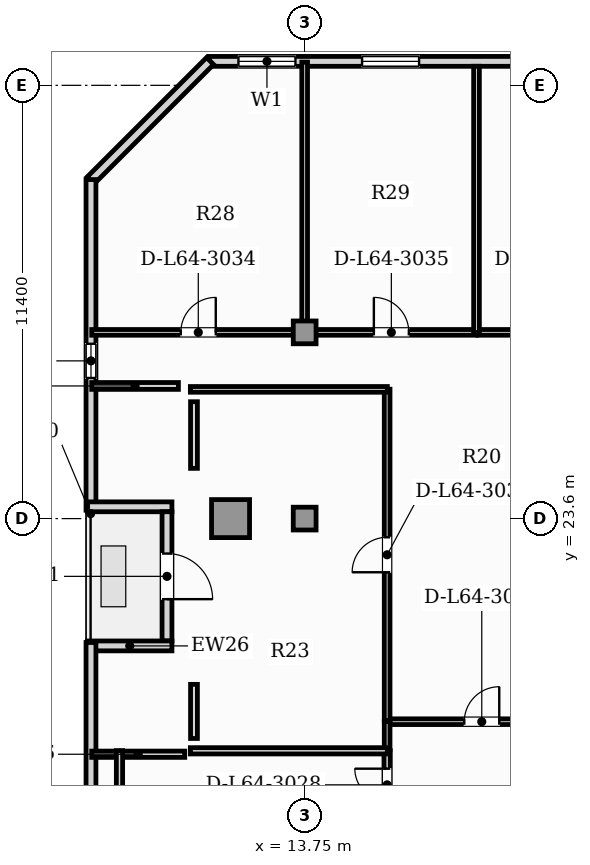
"""IFC4 building model, lengths in metres.
Left out: names, types, materials, properties, quantities, classifications, styles, units other than length and angle.
Written with IfcOpenShell. Run it as: python <this file> out.ifc"""

import sys

from ifc_helpers import new_model, si_unit, direction, frame, frame_2d, origin, origin_2d, place, context, subcontext, project, spatial, rectangle, hollow_rectangle, extrude, element, fill, save


model = new_model("IFC4")
c1 = context("Model", 3, precision=1e-05, world=origin(), true_north=direction((0.0, 1.0)))
c2 = subcontext(c1, "Body", "Model", "MODEL_VIEW")
j1 = project(units=[si_unit("LENGTHUNIT", "METRE"), si_unit("PLANEANGLEUNIT", "RADIAN")], contexts=[c1])
p1 = place(None, origin())
s1 = spatial("IfcSite", under=j1, at=p1, CompositionType="ELEMENT")
p2 = place(p1, origin())
s2 = spatial("IfcBuilding", under=s1, at=p2, CompositionType="ELEMENT")
p3 = place(p2, frame((0.0, 0.0, 260.6)))
s3 = spatial("IfcBuildingStorey", under=s2, at=p3, CompositionType="ELEMENT", Elevation=260.6)
p4 = place(p3, frame((11.8, 23.6, 0.0), z_axis=(0.0, 0.0, 1.0), x_axis=(1.0, 0.0, 0.0)))
e1 = element("IfcColumn", 1, at=p4, inside=s3, PredefinedType="USERDEFINED", context=c2, shape_type="SweptSolid", body=[
    extrude(hollow_rectangle(XDim=1.0, YDim=1.0, WallThickness=0.06, at=origin_2d()), origin(), (0.0, 0.0, 1.0), 3.85),
])
for number, where, z_axis, x_axis in (
    (2, (13.75, 23.6, 0.0), (0.0, 0.0, 1.0), (1.0, 0.0, 0.0)),
    (3, (13.75, 28.5, 0.0), (0.0, 0.0, 1.0), (1.0, 0.0, 0.0)),
):
    element("IfcColumn", number, at=place(p3, frame(where, z_axis=z_axis, x_axis=x_axis)), inside=s3, PredefinedType="COLUMN", context=c2, shape_type="SweptSolid", body=[
        extrude(rectangle(XDim=0.6, YDim=0.6, at=origin_2d()), origin(), (0.0, 0.0, 1.0), 3.85),
    ])
p5 = place(p3, frame((46.262, 35.631, 0.0), z_axis=(0.0, 0.0, 1.0), x_axis=(-1.0, 0.0, 0.0)))
e4 = element("IfcWall", 4, at=p5, inside=s3, PredefinedType="SOLIDWALL", context=c2, shape_type="SweptSolid", body=[
    extrude(rectangle(XDim=35.024, YDim=0.26, at=frame_2d((17.512, 0.0))), origin(), (0.0, 0.0, 1.0), 3.65),
])
p6 = place(p5, frame((32.755, 0.0, 0.9)))
e5 = element("IfcOpeningElement", 5, at=p6, cuts=e4, PredefinedType="OPENING", context=c2, shape_type="SweptSolid", body=[
    extrude(rectangle(XDim=1.5, YDim=1.95, at=frame_2d((0.75, 0.975))), frame((0.0, 0.14, 0.0), z_axis=(0.0, -1.0, 0.0), x_axis=(1.0, 0.0, 0.0)), (0.0, 0.0, 1.0), 0.28),
])
p7 = place(p5, frame((29.501, 0.0, 0.9)))
e6 = element("IfcOpeningElement", 6, at=p7, cuts=e4, PredefinedType="OPENING", context=c2, shape_type="SweptSolid", body=[
    extrude(rectangle(XDim=1.5, YDim=1.95, at=frame_2d((0.75, 0.975))), frame((0.0, 0.14, 0.0), z_axis=(0.0, -1.0, 0.0), x_axis=(1.0, 0.0, 0.0)), (0.0, 0.0, 1.0), 0.28),
])
p8 = place(p5, frame((24.255, 0.0, 0.9)))
e7 = element("IfcOpeningElement", 7, at=p8, cuts=e4, PredefinedType="OPENING", context=c2, shape_type="SweptSolid", body=[
    extrude(rectangle(XDim=1.5, YDim=1.95, at=frame_2d((0.75, 0.975))), frame((0.0, 0.14, 0.0), z_axis=(0.0, -1.0, 0.0), x_axis=(1.0, 0.0, 0.0)), (0.0, 0.0, 1.0), 0.28),
])
p9 = place(p5, frame((20.244, 0.0, 0.9)))
e8 = element("IfcOpeningElement", 8, at=p9, cuts=e4, PredefinedType="OPENING", context=c2, shape_type="SweptSolid", body=[
    extrude(rectangle(XDim=1.5, YDim=1.95, at=frame_2d((0.75, 0.975))), frame((0.0, 0.14, 0.0), z_axis=(0.0, -1.0, 0.0), x_axis=(1.0, 0.0, 0.0)), (0.0, 0.0, 1.0), 0.28),
])
p10 = place(p5, frame((14.427, 0.0, 0.9)))
e9 = element("IfcOpeningElement", 9, at=p10, cuts=e4, PredefinedType="OPENING", context=c2, shape_type="SweptSolid", body=[
    extrude(rectangle(XDim=1.5, YDim=1.95, at=frame_2d((0.75, 0.975))), frame((0.0, 0.14, 0.0), z_axis=(0.0, -1.0, 0.0), x_axis=(1.0, 0.0, 0.0)), (0.0, 0.0, 1.0), 0.28),
])
p11 = place(p5, frame((8.945, 0.0, 0.9)))
e10 = element("IfcOpeningElement", 10, at=p11, cuts=e4, PredefinedType="OPENING", context=c2, shape_type="SweptSolid", body=[
    extrude(rectangle(XDim=1.5, YDim=1.95, at=frame_2d((0.75, 0.975))), frame((0.0, 0.14, 0.0), z_axis=(0.0, -1.0, 0.0), x_axis=(1.0, 0.0, 0.0)), (0.0, 0.0, 1.0), 0.28),
])
p12 = place(p5, frame((4.139, 0.0, 0.9)))
e11 = element("IfcOpeningElement", 11, at=p12, cuts=e4, PredefinedType="OPENING", context=c2, shape_type="SweptSolid", body=[
    extrude(rectangle(XDim=1.5, YDim=1.95, at=frame_2d((0.75, 0.975))), frame((0.0, 0.14, 0.0), z_axis=(0.0, -1.0, 0.0), x_axis=(1.0, 0.0, 0.0)), (0.0, 0.0, 1.0), 0.28),
])
p13 = place(p3, frame((11.261, 35.64, 0.0), z_axis=(0.0, 0.0, 1.0), x_axis=(-0.707106781187, -0.707106781187, 0.0)))
e12 = element("IfcWall", 12, at=p13, inside=s3, PredefinedType="SOLIDWALL", context=c2, shape_type="SweptSolid", body=[
    extrude(rectangle(XDim=4.445, YDim=0.26, at=frame_2d((2.223, 0.0))), origin(), (0.0, 0.0, 1.0), 3.65),
])
p14 = place(p3, frame((8.128, 32.521, 0.0), z_axis=(0.0, 0.0, 1.0), x_axis=(0.0, -1.0, 0.0)))
e13 = element("IfcWall", 13, at=p14, inside=s3, PredefinedType="SOLIDWALL", context=c2, shape_type="SweptSolid", body=[
    extrude(rectangle(XDim=8.7, YDim=0.26, at=frame_2d((4.35, 0.0))), origin(), (0.0, 0.0, 1.0), 3.65),
])
p15 = place(p14, frame((4.321, 0.0, 0.95)))
e14 = element("IfcOpeningElement", 14, at=p15, cuts=e13, PredefinedType="OPENING", context=c2, shape_type="SweptSolid", body=[
    extrude(rectangle(XDim=0.9, YDim=1.5, at=frame_2d((0.45, 0.75))), frame((0.0, 0.14, 0.0), z_axis=(0.0, -1.0, 0.0), x_axis=(1.0, 0.0, 0.0)), (0.0, 0.0, 1.0), 0.28),
])
p16 = place(p3, frame((8.038, 23.91, 0.0), z_axis=(0.0, 0.0, 1.0), x_axis=(1.0, 0.0, 0.0)))
e15 = element("IfcWall", 15, at=p16, inside=s3, PredefinedType="SOLIDWALL", context=c2, shape_type="SweptSolid", body=[
    extrude(rectangle(XDim=2.22, YDim=0.26, at=frame_2d((1.11, 0.0))), origin(), (0.0, 0.0, 1.0), 3.65),
])
p17 = place(p3, frame((10.128, 23.78, 0.0), z_axis=(0.0, 0.0, 1.0), x_axis=(0.0, -1.0, 0.0)))
e16 = element("IfcWall", 16, at=p17, inside=s3, PredefinedType="SOLIDWALL", context=c2, shape_type="SweptSolid", body=[
    extrude(rectangle(XDim=3.4, YDim=0.26, at=frame_2d((1.7, 0.0))), origin(), (0.0, 0.0, 1.0), 3.19),
])
p18 = place(p17, frame((1.1, 0.0, 0.0)))
e17 = element("IfcOpeningElement", 17, at=p18, cuts=e16, PredefinedType="OPENING", context=c2, shape_type="SweptSolid", body=[
    extrude(rectangle(XDim=1.2, YDim=2.2, at=frame_2d((0.6, 1.1))), frame((0.0, 0.14, 0.0), z_axis=(0.0, -1.0, 0.0), x_axis=(1.0, 0.0, 0.0)), (0.0, 0.0, 1.0), 0.28),
])
p19 = place(p3, frame((10.258, 20.25, 0.0), z_axis=(0.0, 0.0, 1.0), x_axis=(-1.0, 0.0, 0.0)))
e18 = element("IfcWall", 18, at=p19, inside=s3, PredefinedType="SOLIDWALL", context=c2, shape_type="SweptSolid", body=[
    extrude(rectangle(XDim=2.22, YDim=0.26, at=frame_2d((1.11, 0.0))), origin(), (0.0, 0.0, 1.0), 3.65),
])
p20 = place(p3, frame((8.128, 20.34, 0.0), z_axis=(0.0, 0.0, 1.0), x_axis=(0.0, -1.0, 0.0)))
e19 = element("IfcWall", 19, at=p20, inside=s3, PredefinedType="SOLIDWALL", context=c2, shape_type="SweptSolid", body=[
    extrude(rectangle(XDim=17.1, YDim=0.26, at=frame_2d((8.55, 0.0))), origin(), (0.0, 0.0, 1.0), 3.65),
])
p21 = place(p20, frame((15.42, 0.0, 0.95)))
e20 = element("IfcOpeningElement", 20, at=p21, cuts=e19, PredefinedType="OPENING", context=c2, shape_type="SweptSolid", body=[
    extrude(rectangle(XDim=0.9, YDim=1.5, at=frame_2d((0.45, 0.75))), frame((0.0, 0.14, 0.0), z_axis=(0.0, -1.0, 0.0), x_axis=(1.0, 0.0, 0.0)), (0.0, 0.0, 1.0), 0.28),
])
p22 = place(p3, frame((15.915, 18.256, 0.0), z_axis=(0.0, 0.0, 1.0), x_axis=(1.0, 0.0, 0.0)))
e21 = element("IfcWall", 21, at=p22, inside=s3, PredefinedType="PARTITIONING", context=c2, shape_type="SweptSolid", body=[
    extrude(rectangle(XDim=4.99, YDim=0.15, at=frame_2d((2.495, 0.0))), origin(), (0.0, 0.0, 1.0), 3.65),
])
p23 = place(p22, frame((2.035, 0.0, 0.0)))
e22 = element("IfcOpeningElement", 22, at=p23, cuts=e21, PredefinedType="OPENING", context=c2, shape_type="SweptSolid", body=[
    extrude(rectangle(XDim=0.92, YDim=2.1, at=frame_2d((0.46, 1.05))), frame((0.0, 0.085, 0.0), z_axis=(0.0, -1.0, 0.0), x_axis=(1.0, 0.0, 0.0)), (0.0, 0.0, 1.0), 0.17),
])
p24 = place(p3, frame((15.92, 15.695, 0.0), z_axis=(0.0, 0.0, 1.0), x_axis=(0.0, 1.0, 0.0)))
e23 = element("IfcWall", 23, at=p24, inside=s3, PredefinedType="PLUMBINGWALL", context=c2, shape_type="SweptSolid", body=[
    extrude(rectangle(XDim=1.8, YDim=0.165, at=frame_2d((0.9, 0.0))), origin(), (0.0, 0.0, 1.0), 3.65),
])
p25 = place(p24, frame((0.475, 0.0, 0.0)))
e24 = element("IfcOpeningElement", 24, at=p25, cuts=e23, PredefinedType="OPENING", context=c2, shape_type="SweptSolid", body=[
    extrude(rectangle(XDim=0.85, YDim=2.1, at=frame_2d((0.425, 1.05))), frame((0.0, 0.093, 0.0), z_axis=(0.0, -1.0, 0.0), x_axis=(1.0, 0.0, 0.0)), (0.0, 0.0, 1.0), 0.185),
])
p26 = place(p3, frame((15.92, 17.525, 0.0), z_axis=(0.0, 0.0, 1.0), x_axis=(0.0, 1.0, 0.0)))
e25 = element("IfcWall", 25, at=p26, inside=s3, PredefinedType="PARTITIONING", context=c2, shape_type="SweptSolid", body=[
    extrude(rectangle(XDim=0.736, YDim=0.15, at=frame_2d((0.368, 0.0))), origin(), (0.0, 0.0, 1.0), 3.65),
])
p27 = place(p3, frame((15.92, 18.291, 0.0), z_axis=(0.0, 0.0, 1.0), x_axis=(0.0, 1.0, 0.0)))
e26 = element("IfcWall", 26, at=p27, inside=s3, PredefinedType="PARTITIONING", context=c2, shape_type="SweptSolid", body=[
    extrude(rectangle(XDim=8.714, YDim=0.15, at=frame_2d((4.357, 0.0))), origin(), (0.0, 0.0, 1.0), 3.65),
])
p28 = place(p27, frame((3.897, 0.0, 0.0)))
e27 = element("IfcOpeningElement", 27, at=p28, cuts=e26, PredefinedType="OPENING", context=c2, shape_type="SweptSolid", body=[
    extrude(rectangle(XDim=0.92, YDim=2.1, at=frame_2d((0.46, 1.05))), frame((0.0, 0.085, 0.0), z_axis=(0.0, -1.0, 0.0), x_axis=(1.0, 0.0, 0.0)), (0.0, 0.0, 1.0), 0.17),
])
p29 = place(p3, frame((10.743, 27.0, 0.0), z_axis=(0.0, 0.0, 1.0), x_axis=(1.0, 0.0, 0.0)))
e28 = element("IfcWall", 28, at=p29, inside=s3, PredefinedType="PARTITIONING", context=c2, shape_type="SweptSolid", body=[
    extrude(rectangle(XDim=5.182, YDim=0.15, at=frame_2d((2.591, 0.0))), origin(), (0.0, 0.0, 1.0), 3.65),
])
p30 = place(p3, frame((8.147, 28.5, 0.0), z_axis=(0.0, 0.0, 1.0), x_axis=(1.0, 0.0, 0.0)))
e29 = element("IfcWall", 29, at=p30, inside=s3, PredefinedType="PARTITIONING", context=c2, shape_type="SweptSolid", body=[
    extrude(rectangle(XDim=5.608, YDim=0.15, at=frame_2d((2.804, 0.0))), origin(), (0.0, 0.0, 1.0), 3.65),
])
p31 = place(p30, frame((2.344, 0.0, 0.0)))
e30 = element("IfcOpeningElement", 30, at=p31, cuts=e29, PredefinedType="OPENING", context=c2, shape_type="SweptSolid", body=[
    extrude(rectangle(XDim=0.92, YDim=2.1, at=frame_2d((0.46, 1.05))), frame((0.0, 0.085, 0.0), z_axis=(0.0, -1.0, 0.0), x_axis=(1.0, 0.0, 0.0)), (0.0, 0.0, 1.0), 0.17),
])
p32 = place(p3, frame((13.785, 28.5, 0.0), z_axis=(0.0, 0.0, 1.0), x_axis=(1.0, 0.0, 0.0)))
e31 = element("IfcWall", 31, at=p32, inside=s3, PredefinedType="PARTITIONING", context=c2, shape_type="SweptSolid", body=[
    extrude(rectangle(XDim=4.492, YDim=0.15, at=frame_2d((2.246, 0.0))), origin(), (0.0, 0.0, 1.0), 3.105),
])
p33 = place(p32, frame((1.786, 0.0, 0.0)))
e32 = element("IfcOpeningElement", 32, at=p33, cuts=e31, PredefinedType="OPENING", context=c2, shape_type="SweptSolid", body=[
    extrude(rectangle(XDim=0.92, YDim=2.1, at=frame_2d((0.46, 1.05))), frame((0.0, 0.085, 0.0), z_axis=(0.0, -1.0, 0.0), x_axis=(1.0, 0.0, 0.0)), (0.0, 0.0, 1.0), 0.17),
])
p34 = place(p3, frame((18.307, 28.5, 0.0), z_axis=(0.0, 0.0, 1.0), x_axis=(1.0, 0.0, 0.0)))
e33 = element("IfcWall", 33, at=p34, inside=s3, PredefinedType="PARTITIONING", context=c2, shape_type="SweptSolid", body=[
    extrude(rectangle(XDim=4.202, YDim=0.15, at=frame_2d((2.101, 0.0))), origin(), (0.0, 0.0, 1.0), 3.105),
])
p35 = place(p34, frame((1.011, 0.0, 0.0)))
e34 = element("IfcOpeningElement", 34, at=p35, cuts=e33, PredefinedType="OPENING", context=c2, shape_type="SweptSolid", body=[
    extrude(rectangle(XDim=0.92, YDim=2.1, at=frame_2d((0.46, 1.05))), frame((0.0, 0.085, 0.0), z_axis=(0.0, -1.0, 0.0), x_axis=(1.0, 0.0, 0.0)), (0.0, 0.0, 1.0), 0.17),
])
p36 = place(p3, frame((10.743, 17.49, 0.0), z_axis=(0.0, 0.0, 1.0), x_axis=(1.0, 0.0, 0.0)))
e35 = element("IfcWall", 35, at=p36, inside=s3, PredefinedType="PLUMBINGWALL", context=c2, shape_type="SweptSolid", body=[
    extrude(rectangle(XDim=5.182, YDim=0.165, at=frame_2d((2.591, 0.0))), origin(), (0.0, 0.0, 1.0), 3.65),
])
p37 = place(p3, frame((13.75, 28.495, 0.0), z_axis=(0.0, 0.0, 1.0), x_axis=(0.0, 1.0, 0.0)))
e36 = element("IfcWall", 36, at=p37, inside=s3, PredefinedType="PARTITIONING", context=c2, shape_type="SweptSolid", body=[
    extrude(rectangle(XDim=7.116, YDim=0.15, at=frame_2d((3.558, 0.0))), origin(), (0.0, 0.0, 1.0), 3.65),
])
p38 = place(p3, frame((18.272, 28.495, 0.0), z_axis=(0.0, 0.0, 1.0), x_axis=(0.0, 1.0, 0.0)))
e37 = element("IfcWall", 37, at=p38, inside=s3, PredefinedType="PARTITIONING", context=c2, shape_type="SweptSolid", body=[
    extrude(rectangle(XDim=7.007, YDim=0.15, at=frame_2d((3.503, 0.0))), origin(), (0.0, 0.0, 1.0), 3.65),
])
p39 = place(p3, frame((10.428, 27.09, 0.0), z_axis=(0.0, 0.0, 1.0), x_axis=(-1.0, 0.0, 0.0)))
e38 = element("IfcWall", 38, at=p39, inside=s3, PredefinedType="PARTITIONING", context=c2, shape_type="SweptSolid", body=[
    extrude(rectangle(XDim=2.281, YDim=0.18, at=frame_2d((1.14, 0.0))), origin(), (0.0, 0.0, 1.0), 3.65),
])
p40 = place(p3, frame((8.147, 17.4, 0.0), z_axis=(0.0, 0.0, 1.0), x_axis=(1.0, 0.0, 0.0)))
e39 = element("IfcWall", 39, at=p40, inside=s3, PredefinedType="PLUMBINGWALL", context=c2, shape_type="SweptSolid", body=[
    extrude(rectangle(XDim=2.447, YDim=0.165, at=frame_2d((1.223, 0.0))), origin(), (0.0, 0.0, 1.0), 3.65),
])
p41 = place(p3, frame((8.878, 15.825, 0.0), z_axis=(0.0, 0.0, 1.0), x_axis=(0.0, 1.0, 0.0)))
e40 = element("IfcWall", 40, at=p41, inside=s3, PredefinedType="PLUMBINGWALL", context=c2, shape_type="SweptSolid", body=[
    extrude(rectangle(XDim=1.67, YDim=0.165, at=frame_2d((0.835, 0.0))), origin(), (0.0, 0.0, 1.0), 3.65),
])
p42 = place(p3, frame((10.838, 17.815, 0.0), z_axis=(0.0, 0.0, 1.0), x_axis=(0.0, 1.0, 0.0)))
e41 = element("IfcWall", 41, at=p42, inside=s3, PredefinedType="PARTITIONING", context=c2, shape_type="SweptSolid", body=[
    extrude(rectangle(XDim=1.424, YDim=0.18, at=frame_2d((0.712, 0.0))), origin(), (0.0, 0.0, 1.0), 3.65),
])
p43 = place(p3, frame((10.838, 24.922, 0.0), z_axis=(0.0, 0.0, 1.0), x_axis=(0.0, 1.0, 0.0)))
e42 = element("IfcWall", 42, at=p43, inside=s3, PredefinedType="PARTITIONING", context=c2, shape_type="SweptSolid", body=[
    extrude(rectangle(XDim=1.753, YDim=0.18, at=frame_2d((0.876, 0.0))), origin(), (0.0, 0.0, 1.0), 3.65),
])
p44 = place(p18, frame((1.2, 0.0, 0.0), z_axis=(0.0, 0.0, 1.0), x_axis=(-1.0, 0.0, 0.0)))
e43 = element("IfcDoor", 43, at=p44, inside=s3, OperationType="SINGLE_SWING_LEFT", PredefinedType="DOOR", context=c2, shape_type="SweptSolid", body=[
    extrude(rectangle(XDim=1.2, YDim=2.2, at=frame_2d((0.6, 1.1))), frame((0.0, 0.025, 0.0), z_axis=(0.0, -1.0, 0.0), x_axis=(1.0, 0.0, 0.0)), (0.0, 0.0, 1.0), 0.05),
])
fill(e17, e43)
p45 = place(p15, origin())
e44 = element("IfcWindow", 44, at=p45, inside=s3, PartitioningType="SINGLE_PANEL", PredefinedType="WINDOW", context=c2, shape_type="SweptSolid", body=[
    extrude(rectangle(XDim=0.9, YDim=1.5, at=frame_2d((0.45, 0.75))), frame((0.0, 0.03, 0.0), z_axis=(0.0, -1.0, 0.0), x_axis=(1.0, 0.0, 0.0)), (0.0, 0.0, 1.0), 0.06),
])
fill(e14, e44)
p46 = place(p6, origin())
e45 = element("IfcWindow", 45, at=p46, inside=s3, PartitioningType="SINGLE_PANEL", PredefinedType="WINDOW", context=c2, shape_type="SweptSolid", body=[
    extrude(rectangle(XDim=1.5, YDim=1.95, at=frame_2d((0.75, 0.975))), frame((0.0, 0.03, 0.0), z_axis=(0.0, -1.0, 0.0), x_axis=(1.0, 0.0, 0.0)), (0.0, 0.0, 1.0), 0.06),
])
fill(e5, e45)
p47 = place(p7, origin())
e46 = element("IfcWindow", 46, at=p47, inside=s3, PartitioningType="SINGLE_PANEL", PredefinedType="WINDOW", context=c2, shape_type="SweptSolid", body=[
    extrude(rectangle(XDim=1.5, YDim=1.95, at=frame_2d((0.75, 0.975))), frame((0.0, 0.03, 0.0), z_axis=(0.0, -1.0, 0.0), x_axis=(1.0, 0.0, 0.0)), (0.0, 0.0, 1.0), 0.06),
])
fill(e6, e46)
p48 = place(p23, origin())
e47 = element("IfcDoor", 47, at=p48, inside=s3, OperationType="SINGLE_SWING_RIGHT", PredefinedType="DOOR", context=c2, shape_type="SweptSolid", body=[
    extrude(rectangle(XDim=0.92, YDim=2.1, at=frame_2d((0.46, 1.05))), frame((0.0, 0.025, 0.0), z_axis=(0.0, -1.0, 0.0), x_axis=(1.0, 0.0, 0.0)), (0.0, 0.0, 1.0), 0.05),
])
fill(e22, e47)
p49 = place(p25, origin())
e48 = element("IfcDoor", 48, at=p49, inside=s3, OperationType="SINGLE_SWING_RIGHT", PredefinedType="DOOR", context=c2, shape_type="SweptSolid", body=[
    extrude(rectangle(XDim=0.85, YDim=2.1, at=frame_2d((0.425, 1.05))), frame((0.0, 0.025, 0.0), z_axis=(0.0, -1.0, 0.0), x_axis=(1.0, 0.0, 0.0)), (0.0, 0.0, 1.0), 0.05),
])
fill(e24, e48)
p50 = place(p28, origin())
e49 = element("IfcDoor", 49, at=p50, inside=s3, OperationType="SINGLE_SWING_LEFT", PredefinedType="DOOR", context=c2, shape_type="SweptSolid", body=[
    extrude(rectangle(XDim=0.92, YDim=2.1, at=frame_2d((0.46, 1.05))), frame((0.0, 0.025, 0.0), z_axis=(0.0, -1.0, 0.0), x_axis=(1.0, 0.0, 0.0)), (0.0, 0.0, 1.0), 0.05),
])
fill(e27, e49)
p51 = place(p31, origin())
e50 = element("IfcDoor", 50, at=p51, inside=s3, OperationType="SINGLE_SWING_RIGHT", PredefinedType="DOOR", context=c2, shape_type="SweptSolid", body=[
    extrude(rectangle(XDim=0.92, YDim=2.1, at=frame_2d((0.46, 1.05))), frame((0.0, 0.025, 0.0), z_axis=(0.0, -1.0, 0.0), x_axis=(1.0, 0.0, 0.0)), (0.0, 0.0, 1.0), 0.05),
])
fill(e30, e50)
p52 = place(p33, origin())
e51 = element("IfcDoor", 51, at=p52, inside=s3, OperationType="SINGLE_SWING_LEFT", PredefinedType="DOOR", context=c2, shape_type="SweptSolid", body=[
    extrude(rectangle(XDim=0.92, YDim=2.1, at=frame_2d((0.46, 1.05))), frame((0.0, 0.025, 0.0), z_axis=(0.0, -1.0, 0.0), x_axis=(1.0, 0.0, 0.0)), (0.0, 0.0, 1.0), 0.05),
])
fill(e32, e51)
save(model, sys.argv[1])
